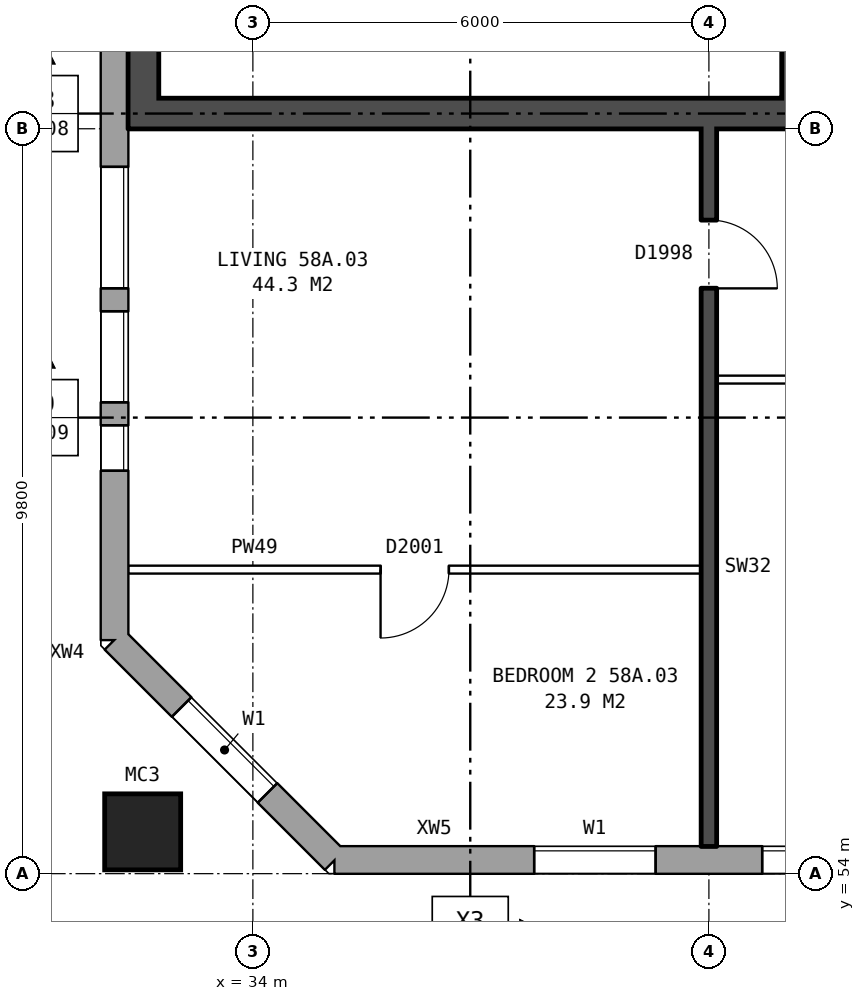
"""IFC4 building model, lengths in metres.
Left out: names, types, materials, properties, quantities, classifications, styles, units other than length and angle.
Written with IfcOpenShell. Run it as: python <this file> out.ifc"""

import sys

from ifc_helpers import new_model, si_unit, direction, frame, frame_2d, origin, origin_2d, place, context, subcontext, project, spatial, rectangle, hollow_rectangle, extrude, element, fill, save


model = new_model("IFC4")
c1 = context("Model", 3, precision=1e-05, world=origin(), true_north=direction((0.0, 1.0)))
c2 = subcontext(c1, "Body", "Model", "MODEL_VIEW")
j1 = project(units=[si_unit("LENGTHUNIT", "METRE"), si_unit("PLANEANGLEUNIT", "RADIAN")], contexts=[c1])
p1 = place(None, origin())
s1 = spatial("IfcSite", under=j1, at=p1, CompositionType="ELEMENT")
p2 = place(p1, origin())
s2 = spatial("IfcBuilding", under=s1, at=p2, CompositionType="ELEMENT")
p3 = place(p2, frame((0.0, 0.0, 205.9)))
s3 = spatial("IfcBuildingStorey", under=s2, at=p3, CompositionType="ELEMENT", Elevation=205.9)
p4 = place(p3, frame((32.55, 54.55, 0.0), z_axis=(0.0, 0.0, 1.0), x_axis=(1.0, 0.0, 0.0)))
e1 = element("IfcColumn", 1, at=p4, inside=s3, PredefinedType="COLUMN", context=c2, shape_type="SweptSolid", body=[
    extrude(hollow_rectangle(XDim=1.0, YDim=1.0, WallThickness=0.055, at=origin_2d()), origin(), (0.0, 0.0, 1.0), 3.1),
])
p5 = place(p3, frame((32.18, 57.075, 0.0), z_axis=(0.0, 0.0, 1.0), x_axis=(0.707106781187, -0.707106781187, 0.0)))
e2 = element("IfcWall", 2, at=p5, inside=s3, PredefinedType="STANDARD", context=c2, shape_type="SweptSolid", body=[
    extrude(rectangle(XDim=4.094, YDim=0.36, at=frame_2d((2.047, 0.0))), origin(), (0.0, 0.0, 1.0), 2.85),
])
p6 = place(p5, frame((1.247, 0.0, 0.8)))
e3 = element("IfcOpeningElement", 3, at=p6, cuts=e2, PredefinedType="OPENING", context=c2, shape_type="SweptSolid", body=[
    extrude(rectangle(XDim=1.6, YDim=1.8, at=frame_2d((0.8, 0.9))), frame((0.0, 0.19, 0.0), z_axis=(0.0, -1.0, 0.0), x_axis=(1.0, 0.0, 0.0)), (0.0, 0.0, 1.0), 0.38),
])
p7 = place(p3, frame((35.075, 54.18, 0.0), z_axis=(0.0, 0.0, 1.0), x_axis=(1.0, 0.0, 0.0)))
e4 = element("IfcWall", 4, at=p7, inside=s3, PredefinedType="STANDARD", context=c2, shape_type="SweptSolid", body=[
    extrude(rectangle(XDim=39.875, YDim=0.36, at=frame_2d((19.938, 0.0))), origin(), (0.0, 0.0, 1.0), 2.85),
])
p8 = place(p7, frame((2.625, 0.0, 0.8)))
e5 = element("IfcOpeningElement", 5, at=p8, cuts=e4, PredefinedType="OPENING", context=c2, shape_type="SweptSolid", body=[
    extrude(rectangle(XDim=1.6, YDim=1.8, at=frame_2d((0.8, 0.9))), frame((0.0, 0.19, 0.0), z_axis=(0.0, -1.0, 0.0), x_axis=(1.0, 0.0, 0.0)), (0.0, 0.0, 1.0), 0.38),
])
p9 = place(p7, frame((5.625, 0.0, 0.8)))
e6 = element("IfcOpeningElement", 6, at=p9, cuts=e4, PredefinedType="OPENING", context=c2, shape_type="SweptSolid", body=[
    extrude(rectangle(XDim=1.6, YDim=1.8, at=frame_2d((0.8, 0.9))), frame((0.0, 0.19, 0.0), z_axis=(0.0, -1.0, 0.0), x_axis=(1.0, 0.0, 0.0)), (0.0, 0.0, 1.0), 0.38),
])
p10 = place(p7, frame((8.625, 0.0, 0.8)))
e7 = element("IfcOpeningElement", 7, at=p10, cuts=e4, PredefinedType="OPENING", context=c2, shape_type="SweptSolid", body=[
    extrude(rectangle(XDim=1.6, YDim=1.8, at=frame_2d((0.8, 0.9))), frame((0.0, 0.19, 0.0), z_axis=(0.0, -1.0, 0.0), x_axis=(1.0, 0.0, 0.0)), (0.0, 0.0, 1.0), 0.38),
])
p11 = place(p7, frame((11.625, 0.0, 0.8)))
e8 = element("IfcOpeningElement", 8, at=p11, cuts=e4, PredefinedType="OPENING", context=c2, shape_type="SweptSolid", body=[
    extrude(rectangle(XDim=1.6, YDim=1.8, at=frame_2d((0.8, 0.9))), frame((0.0, 0.19, 0.0), z_axis=(0.0, -1.0, 0.0), x_axis=(1.0, 0.0, 0.0)), (0.0, 0.0, 1.0), 0.38),
])
p12 = place(p7, frame((14.625, 0.0, 0.8)))
e9 = element("IfcOpeningElement", 9, at=p12, cuts=e4, PredefinedType="OPENING", context=c2, shape_type="SweptSolid", body=[
    extrude(rectangle(XDim=1.6, YDim=1.8, at=frame_2d((0.8, 0.9))), frame((0.0, 0.19, 0.0), z_axis=(0.0, -1.0, 0.0), x_axis=(1.0, 0.0, 0.0)), (0.0, 0.0, 1.0), 0.38),
])
p13 = place(p7, frame((17.625, 0.0, 0.8)))
e10 = element("IfcOpeningElement", 10, at=p13, cuts=e4, PredefinedType="OPENING", context=c2, shape_type="SweptSolid", body=[
    extrude(rectangle(XDim=1.6, YDim=1.8, at=frame_2d((0.8, 0.9))), frame((0.0, 0.19, 0.0), z_axis=(0.0, -1.0, 0.0), x_axis=(1.0, 0.0, 0.0)), (0.0, 0.0, 1.0), 0.38),
])
p14 = place(p7, frame((20.625, 0.0, 0.8)))
e11 = element("IfcOpeningElement", 11, at=p14, cuts=e4, PredefinedType="OPENING", context=c2, shape_type="SweptSolid", body=[
    extrude(rectangle(XDim=1.6, YDim=1.8, at=frame_2d((0.8, 0.9))), frame((0.0, 0.19, 0.0), z_axis=(0.0, -1.0, 0.0), x_axis=(1.0, 0.0, 0.0)), (0.0, 0.0, 1.0), 0.38),
])
p15 = place(p7, frame((23.625, 0.0, 0.8)))
e12 = element("IfcOpeningElement", 12, at=p15, cuts=e4, PredefinedType="OPENING", context=c2, shape_type="SweptSolid", body=[
    extrude(rectangle(XDim=1.6, YDim=1.8, at=frame_2d((0.8, 0.9))), frame((0.0, 0.19, 0.0), z_axis=(0.0, -1.0, 0.0), x_axis=(1.0, 0.0, 0.0)), (0.0, 0.0, 1.0), 0.38),
])
p16 = place(p7, frame((26.625, 0.0, 0.8)))
e13 = element("IfcOpeningElement", 13, at=p16, cuts=e4, PredefinedType="OPENING", context=c2, shape_type="SweptSolid", body=[
    extrude(rectangle(XDim=1.6, YDim=1.8, at=frame_2d((0.8, 0.9))), frame((0.0, 0.19, 0.0), z_axis=(0.0, -1.0, 0.0), x_axis=(1.0, 0.0, 0.0)), (0.0, 0.0, 1.0), 0.38),
])
p17 = place(p7, frame((29.625, 0.0, 0.8)))
e14 = element("IfcOpeningElement", 14, at=p17, cuts=e4, PredefinedType="OPENING", context=c2, shape_type="SweptSolid", body=[
    extrude(rectangle(XDim=1.6, YDim=1.8, at=frame_2d((0.8, 0.9))), frame((0.0, 0.19, 0.0), z_axis=(0.0, -1.0, 0.0), x_axis=(1.0, 0.0, 0.0)), (0.0, 0.0, 1.0), 0.38),
])
p18 = place(p7, frame((32.625, 0.0, 0.8)))
e15 = element("IfcOpeningElement", 15, at=p18, cuts=e4, PredefinedType="OPENING", context=c2, shape_type="SweptSolid", body=[
    extrude(rectangle(XDim=1.6, YDim=1.8, at=frame_2d((0.8, 0.9))), frame((0.0, 0.19, 0.0), z_axis=(0.0, -1.0, 0.0), x_axis=(1.0, 0.0, 0.0)), (0.0, 0.0, 1.0), 0.38),
])
p19 = place(p7, frame((35.125, 0.0, 0.8)))
e16 = element("IfcOpeningElement", 16, at=p19, cuts=e4, PredefinedType="OPENING", context=c2, shape_type="SweptSolid", body=[
    extrude(rectangle(XDim=1.0, YDim=1.8, at=frame_2d((0.5, 0.9))), frame((0.0, 0.19, 0.0), z_axis=(0.0, -1.0, 0.0), x_axis=(1.0, 0.0, 0.0)), (0.0, 0.0, 1.0), 0.38),
])
p20 = place(p7, frame((38.475, 0.0, 0.8)))
e17 = element("IfcOpeningElement", 17, at=p20, cuts=e4, PredefinedType="OPENING", context=c2, shape_type="SweptSolid", body=[
    extrude(rectangle(XDim=1.0, YDim=1.8, at=frame_2d((0.5, 0.9))), frame((0.0, 0.19, 0.0), z_axis=(0.0, -1.0, 0.0), x_axis=(1.0, 0.0, 0.0)), (0.0, 0.0, 1.0), 0.38),
])
p21 = place(p3, frame((32.18, 82.925, 0.0), z_axis=(0.0, 0.0, 1.0), x_axis=(0.0, -1.0, 0.0)))
e18 = element("IfcWall", 18, at=p21, inside=s3, PredefinedType="STANDARD", context=c2, shape_type="SweptSolid", body=[
    extrude(rectangle(XDim=25.851, YDim=0.36, at=frame_2d((12.925, 0.0))), origin(), (0.0, 0.0, 1.0), 2.85),
])
p22 = place(p21, frame((2.225, 0.0, 0.8)))
e19 = element("IfcOpeningElement", 19, at=p22, cuts=e18, PredefinedType="OPENING", context=c2, shape_type="SweptSolid", body=[
    extrude(rectangle(XDim=0.6, YDim=0.9, at=frame_2d((0.3, 0.45))), frame((0.0, 0.19, 0.0), z_axis=(0.0, -1.0, 0.0), x_axis=(1.0, 0.0, 0.0)), (0.0, 0.0, 1.0), 0.38),
])
p23 = place(p21, frame((4.625, 0.0, 0.8)))
e20 = element("IfcOpeningElement", 20, at=p23, cuts=e18, PredefinedType="OPENING", context=c2, shape_type="SweptSolid", body=[
    extrude(rectangle(XDim=1.6, YDim=1.8, at=frame_2d((0.8, 0.9))), frame((0.0, 0.19, 0.0), z_axis=(0.0, -1.0, 0.0), x_axis=(1.0, 0.0, 0.0)), (0.0, 0.0, 1.0), 0.38),
])
p24 = place(p21, frame((19.625, 0.0, 0.8)))
e21 = element("IfcOpeningElement", 21, at=p24, cuts=e18, PredefinedType="OPENING", context=c2, shape_type="SweptSolid", body=[
    extrude(rectangle(XDim=1.6, YDim=1.8, at=frame_2d((0.8, 0.9))), frame((0.0, 0.19, 0.0), z_axis=(0.0, -1.0, 0.0), x_axis=(1.0, 0.0, 0.0)), (0.0, 0.0, 1.0), 0.38),
])
p25 = place(p21, frame((21.525, 0.0, 0.8)))
e22 = element("IfcOpeningElement", 22, at=p25, cuts=e18, PredefinedType="OPENING", context=c2, shape_type="SweptSolid", body=[
    extrude(rectangle(XDim=1.2, YDim=1.8, at=frame_2d((0.6, 0.9))), frame((0.0, 0.19, 0.0), z_axis=(0.0, -1.0, 0.0), x_axis=(1.0, 0.0, 0.0)), (0.0, 0.0, 1.0), 0.38),
])
p26 = place(p21, frame((3.125, 0.0, 0.8)))
e23 = element("IfcOpeningElement", 23, at=p26, cuts=e18, PredefinedType="OPENING", context=c2, shape_type="SweptSolid", body=[
    extrude(rectangle(XDim=1.2, YDim=1.8, at=frame_2d((0.6, 0.9))), frame((0.0, 0.19, 0.0), z_axis=(0.0, -1.0, 0.0), x_axis=(1.0, 0.0, 0.0)), (0.0, 0.0, 1.0), 0.38),
])
p27 = place(p21, frame((23.025, 0.0, 0.8)))
e24 = element("IfcOpeningElement", 24, at=p27, cuts=e18, PredefinedType="OPENING", context=c2, shape_type="SweptSolid", body=[
    extrude(rectangle(XDim=0.6, YDim=0.9, at=frame_2d((0.3, 0.45))), frame((0.0, 0.19, 0.0), z_axis=(0.0, -1.0, 0.0), x_axis=(1.0, 0.0, 0.0)), (0.0, 0.0, 1.0), 0.38),
])
p28 = place(p3, frame((41.16, 76.2, 0.0), z_axis=(0.0, 0.0, 1.0), x_axis=(0.0, -1.0, 0.0)))
e25 = element("IfcWall", 25, at=p28, inside=s3, PredefinedType="SHEAR", context=c2, shape_type="SweptSolid", body=[
    extrude(rectangle(XDim=12.4, YDim=0.4, at=frame_2d((6.2, 0.0))), origin(), (0.0, 0.0, 1.0), 2.85),
])
p29 = place(p28, frame((1.325, 0.0, 0.0)))
e26 = element("IfcOpeningElement", 26, at=p29, cuts=e25, PredefinedType="OPENING", context=c2, shape_type="SweptSolid", body=[
    extrude(rectangle(XDim=1.1, YDim=2.1, at=frame_2d((0.55, 1.05))), frame((0.0, 0.21, 0.0), z_axis=(0.0, -1.0, 0.0), x_axis=(1.0, 0.0, 0.0)), (0.0, 0.0, 1.0), 0.42),
])
p30 = place(p28, frame((4.225, 0.0, 0.0)))
e27 = element("IfcOpeningElement", 27, at=p30, cuts=e25, PredefinedType="OPENING", context=c2, shape_type="SweptSolid", body=[
    extrude(rectangle(XDim=0.85, YDim=2.1, at=frame_2d((0.425, 1.05))), frame((0.0, 0.21, 0.0), z_axis=(0.0, -1.0, 0.0), x_axis=(1.0, 0.0, 0.0)), (0.0, 0.0, 1.0), 0.42),
])
p31 = place(p28, frame((7.475, 0.0, 0.0)))
e28 = element("IfcOpeningElement", 28, at=p31, cuts=e25, PredefinedType="OPENING", context=c2, shape_type="SweptSolid", body=[
    extrude(rectangle(XDim=0.85, YDim=2.1, at=frame_2d((0.425, 1.05))), frame((0.0, 0.21, 0.0), z_axis=(0.0, -1.0, 0.0), x_axis=(1.0, 0.0, 0.0)), (0.0, 0.0, 1.0), 0.42),
])
p32 = place(p28, frame((9.9, 0.0, 0.0)))
e29 = element("IfcOpeningElement", 29, at=p32, cuts=e25, PredefinedType="OPENING", context=c2, shape_type="SweptSolid", body=[
    extrude(rectangle(XDim=1.1, YDim=2.1, at=frame_2d((0.55, 1.05))), frame((0.0, 0.21, 0.0), z_axis=(0.0, -1.0, 0.0), x_axis=(1.0, 0.0, 0.0)), (0.0, 0.0, 1.0), 0.42),
])
p33 = place(p3, frame((32.56, 76.2, 0.0), z_axis=(0.0, 0.0, 1.0), x_axis=(0.0, -1.0, 0.0)))
e30 = element("IfcWall", 30, at=p33, inside=s3, PredefinedType="SHEAR", context=c2, shape_type="SweptSolid", body=[
    extrude(rectangle(XDim=12.4, YDim=0.4, at=frame_2d((6.2, 0.0))), origin(), (0.0, 0.0, 1.0), 2.85),
])
p34 = place(p3, frame((40.96, 64.0, 0.0), z_axis=(0.0, 0.0, 1.0), x_axis=(-1.0, 0.0, 0.0)))
e31 = element("IfcWall", 31, at=p34, inside=s3, PredefinedType="SHEAR", context=c2, shape_type="SweptSolid", body=[
    extrude(rectangle(XDim=8.2, YDim=0.4, at=frame_2d((4.1, 0.0))), origin(), (0.0, 0.0, 1.0), 2.85),
])
p35 = place(p3, frame((32.36, 58.0, 0.0), z_axis=(0.0, 0.0, 1.0), x_axis=(1.0, 0.0, 0.0)))
e32 = element("IfcWall", 32, at=p35, inside=s3, PredefinedType="PARTITIONING", context=c2, shape_type="SweptSolid", body=[
    extrude(rectangle(XDim=7.54, YDim=0.1, at=frame_2d((3.77, 0.0))), origin(), (0.0, 0.0, 1.0), 2.85),
])
p36 = place(p35, frame((3.32, 0.0, 0.0)))
e33 = element("IfcOpeningElement", 33, at=p36, cuts=e32, PredefinedType="OPENING", context=c2, shape_type="SweptSolid", body=[
    extrude(rectangle(XDim=0.9, YDim=2.1, at=frame_2d((0.45, 1.05))), frame((0.0, 0.06, 0.0), z_axis=(0.0, -1.0, 0.0), x_axis=(1.0, 0.0, 0.0)), (0.0, 0.0, 1.0), 0.12),
])
p37 = place(p3, frame((40.1, 60.5, 0.0), z_axis=(0.0, 0.0, 1.0), x_axis=(1.0, 0.0, 0.0)))
e34 = element("IfcWall", 34, at=p37, inside=s3, PredefinedType="PARTITIONING", context=c2, shape_type="SweptSolid", body=[
    extrude(rectangle(XDim=5.8, YDim=0.1, at=frame_2d((2.9, 0.0))), origin(), (0.0, 0.0, 1.0), 2.85),
])
p38 = place(p37, frame((1.3, 0.0, 0.0)))
e35 = element("IfcOpeningElement", 35, at=p38, cuts=e34, PredefinedType="OPENING", context=c2, shape_type="SweptSolid", body=[
    extrude(rectangle(XDim=0.9, YDim=2.1, at=frame_2d((0.45, 1.05))), frame((0.0, 0.06, 0.0), z_axis=(0.0, -1.0, 0.0), x_axis=(1.0, 0.0, 0.0)), (0.0, 0.0, 1.0), 0.12),
])
p39 = place(p37, frame((4.2, 0.0, 0.0)))
e36 = element("IfcOpeningElement", 36, at=p39, cuts=e34, PredefinedType="OPENING", context=c2, shape_type="SweptSolid", body=[
    extrude(rectangle(XDim=0.9, YDim=2.1, at=frame_2d((0.45, 1.05))), frame((0.0, 0.06, 0.0), z_axis=(0.0, -1.0, 0.0), x_axis=(1.0, 0.0, 0.0)), (0.0, 0.0, 1.0), 0.12),
])
p40 = place(p3, frame((40.0, 54.36, 0.0), z_axis=(0.0, 0.0, 1.0), x_axis=(0.0, 1.0, 0.0)))
e37 = element("IfcWall", 37, at=p40, inside=s3, PredefinedType="SOLIDWALL", context=c2, shape_type="SweptSolid", body=[
    extrude(rectangle(XDim=9.44, YDim=0.2, at=frame_2d((4.72, 0.0))), origin(), (0.0, 0.0, 1.0), 2.85),
])
p41 = place(p40, frame((7.34, 0.0, 0.0)))
e38 = element("IfcOpeningElement", 38, at=p41, cuts=e37, PredefinedType="OPENING", context=c2, shape_type="SweptSolid", body=[
    extrude(rectangle(XDim=0.9, YDim=2.1, at=frame_2d((0.45, 1.05))), frame((0.0, 0.11, 0.0), z_axis=(0.0, -1.0, 0.0), x_axis=(1.0, 0.0, 0.0)), (0.0, 0.0, 1.0), 0.22),
])
p42 = place(p6, origin())
e39 = element("IfcWindow", 39, at=p42, inside=s3, PartitioningType="SINGLE_PANEL", PredefinedType="WINDOW", context=c2, shape_type="SweptSolid", body=[
    extrude(rectangle(XDim=1.6, YDim=1.8, at=frame_2d((0.8, 0.9))), frame((0.0, 0.15, 0.0), z_axis=(0.0, -1.0, 0.0), x_axis=(1.0, 0.0, 0.0)), (0.0, 0.0, 1.0), 0.06),
])
fill(e3, e39)
p43 = place(p8, origin())
e40 = element("IfcWindow", 40, at=p43, inside=s3, PartitioningType="SINGLE_PANEL", PredefinedType="WINDOW", context=c2, shape_type="SweptSolid", body=[
    extrude(rectangle(XDim=1.6, YDim=1.8, at=frame_2d((0.8, 0.9))), frame((0.0, 0.15, 0.0), z_axis=(0.0, -1.0, 0.0), x_axis=(1.0, 0.0, 0.0)), (0.0, 0.0, 1.0), 0.06),
])
fill(e5, e40)
p44 = place(p9, origin())
e41 = element("IfcWindow", 41, at=p44, inside=s3, PartitioningType="SINGLE_PANEL", PredefinedType="WINDOW", context=c2, shape_type="SweptSolid", body=[
    extrude(rectangle(XDim=1.6, YDim=1.8, at=frame_2d((0.8, 0.9))), frame((0.0, 0.15, 0.0), z_axis=(0.0, -1.0, 0.0), x_axis=(1.0, 0.0, 0.0)), (0.0, 0.0, 1.0), 0.06),
])
fill(e6, e41)
p45 = place(p24, origin())
e42 = element("IfcWindow", 42, at=p45, inside=s3, PartitioningType="SINGLE_PANEL", PredefinedType="WINDOW", context=c2, shape_type="SweptSolid", body=[
    extrude(rectangle(XDim=1.6, YDim=1.8, at=frame_2d((0.8, 0.9))), frame((0.0, 0.15, 0.0), z_axis=(0.0, -1.0, 0.0), x_axis=(1.0, 0.0, 0.0)), (0.0, 0.0, 1.0), 0.06),
])
fill(e21, e42)
p46 = place(p25, origin())
e43 = element("IfcWindow", 43, at=p46, inside=s3, PartitioningType="SINGLE_PANEL", PredefinedType="WINDOW", context=c2, shape_type="SweptSolid", body=[
    extrude(rectangle(XDim=1.2, YDim=1.8, at=frame_2d((0.6, 0.9))), frame((0.0, 0.15, 0.0), z_axis=(0.0, -1.0, 0.0), x_axis=(1.0, 0.0, 0.0)), (0.0, 0.0, 1.0), 0.06),
])
fill(e22, e43)
p47 = place(p36, frame((0.9, 0.0, 0.0), z_axis=(0.0, 0.0, 1.0), x_axis=(-1.0, 0.0, 0.0)))
e44 = element("IfcDoor", 44, at=p47, inside=s3, OperationType="SINGLE_SWING_RIGHT", PredefinedType="DOOR", context=c2, shape_type="SweptSolid", body=[
    extrude(rectangle(XDim=0.9, YDim=2.1, at=frame_2d((0.45, 1.05))), frame((0.0, 0.025, 0.0), z_axis=(0.0, -1.0, 0.0), x_axis=(1.0, 0.0, 0.0)), (0.0, 0.0, 1.0), 0.05),
])
fill(e33, e44)
p48 = place(p41, frame((0.9, 0.0, 0.0), z_axis=(0.0, 0.0, 1.0), x_axis=(-1.0, 0.0, 0.0)))
e45 = element("IfcDoor", 45, at=p48, inside=s3, OperationType="SINGLE_SWING_RIGHT", PredefinedType="DOOR", context=c2, shape_type="SweptSolid", body=[
    extrude(rectangle(XDim=0.9, YDim=2.1, at=frame_2d((0.45, 1.05))), frame((0.0, 0.025, 0.0), z_axis=(0.0, -1.0, 0.0), x_axis=(1.0, 0.0, 0.0)), (0.0, 0.0, 1.0), 0.05),
])
fill(e38, e45)
p49 = place(p27, origin())
e46 = element("IfcWindow", 46, at=p49, inside=s3, PartitioningType="SINGLE_PANEL", PredefinedType="WINDOW", context=c2, shape_type="SweptSolid", body=[
    extrude(rectangle(XDim=0.6, YDim=0.9, at=frame_2d((0.3, 0.45))), frame((0.0, 0.15, 0.0), z_axis=(0.0, -1.0, 0.0), x_axis=(1.0, 0.0, 0.0)), (0.0, 0.0, 1.0), 0.06),
])
fill(e24, e46)
save(model, sys.argv[1])
